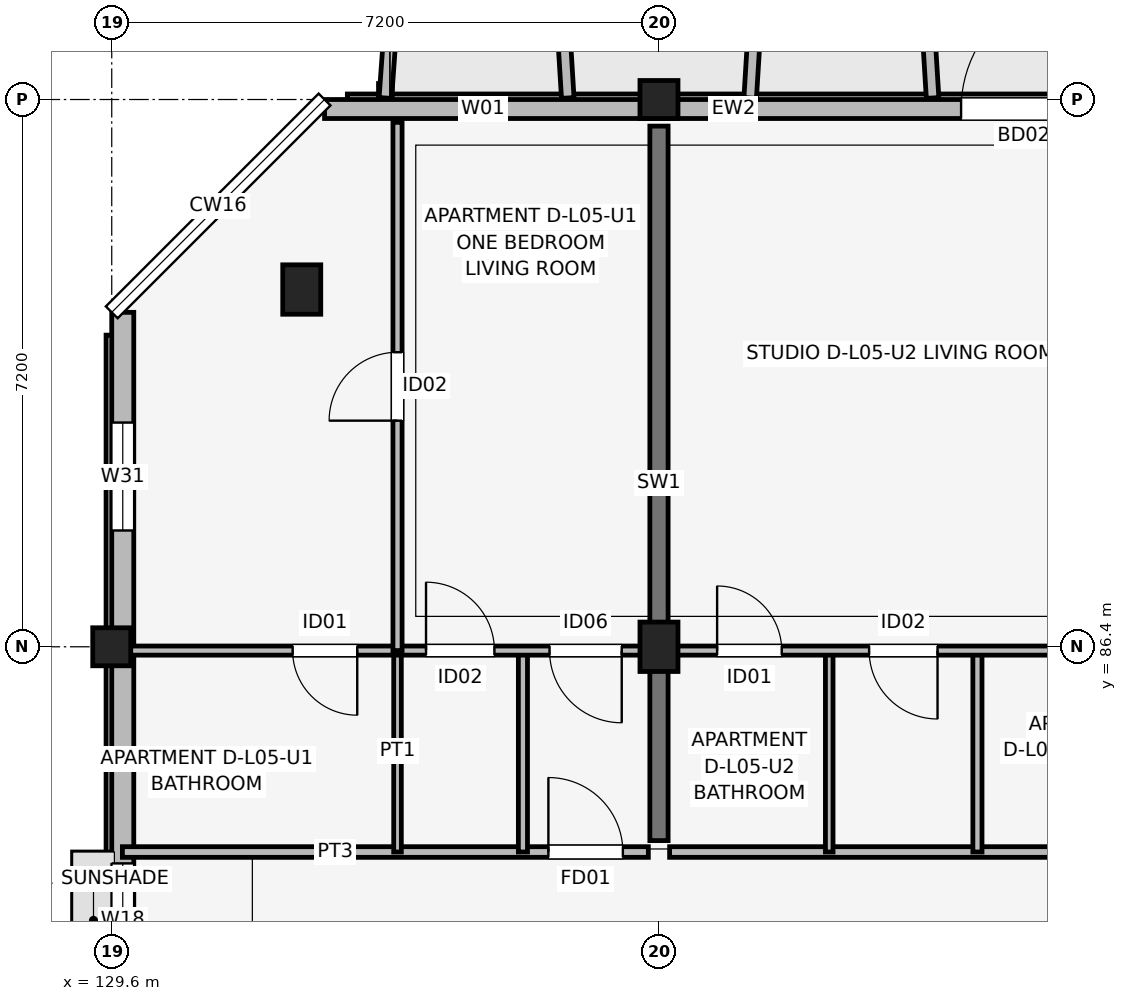
"""IFC4 building model, lengths in metres.
Left out: names, types, materials, properties, quantities, classifications, styles, units other than length and angle.
Written with IfcOpenShell. Run it as: python <this file> out.ifc"""

import sys

from ifc_helpers import new_model, si_unit, direction, frame, frame_2d, origin, origin_2d, place, context, subcontext, project, spatial, rectangle, extrude, element, fill, save


model = new_model("IFC4")
c1 = context("Model", 3, precision=1e-05, world=origin(), true_north=direction((0.0, 1.0)))
c2 = subcontext(c1, "Body", "Model", "MODEL_VIEW")
j1 = project(units=[si_unit("LENGTHUNIT", "METRE"), si_unit("PLANEANGLEUNIT", "RADIAN")], contexts=[c1])
p1 = place(None, origin())
s1 = spatial("IfcSite", under=j1, at=p1, CompositionType="ELEMENT")
p2 = place(p1, origin())
s2 = spatial("IfcBuilding", under=s1, at=p2, CompositionType="ELEMENT")
p3 = place(p2, frame((0.0, 0.0, 18.15)))
s3 = spatial("IfcBuildingStorey", under=s2, at=p3, CompositionType="ELEMENT", Elevation=18.15)
p4 = place(p3, frame((129.6, 86.4, 0.0), z_axis=(0.0, 0.0, 1.0), x_axis=(1.0, 0.0, 0.0)))
e1 = element("IfcColumn", 1, at=p4, inside=s3, PredefinedType="COLUMN", context=c2, shape_type="SweptSolid", body=[
    extrude(rectangle(XDim=0.5, YDim=0.5, at=origin_2d()), origin(), (0.0, 0.0, 1.0), 3.15),
])
for number, where, z_axis, x_axis in (
    (2, (132.1, 91.1, 0.0), (0.0, 0.0, 1.0), (1.0, 0.0, 0.0)),
    (3, (136.8, 86.4, 0.0), (0.0, 0.0, 1.0), (1.0, 0.0, 0.0)),
):
    element("IfcColumn", number, at=place(p3, frame(where, z_axis=z_axis, x_axis=x_axis)), inside=s3, PredefinedType="COLUMN", context=c2, shape_type="SweptSolid", body=[
        extrude(rectangle(XDim=0.5, YDim=0.65, at=origin_2d()), origin(), (0.0, 0.0, 1.0), 3.15),
    ])
p5 = place(p3, frame((136.8, 93.6, 0.0), z_axis=(0.0, 0.0, 1.0), x_axis=(1.0, 0.0, 0.0)))
e4 = element("IfcColumn", 4, at=p5, inside=s3, PredefinedType="COLUMN", context=c2, shape_type="SweptSolid", body=[
    extrude(rectangle(XDim=0.5, YDim=0.5, at=origin_2d()), origin(), (0.0, 0.0, 1.0), 3.15),
])
p6 = place(p3, frame((136.8, 83.85, 0.0), z_axis=(0.0, 0.0, 1.0), x_axis=(0.0, 1.0, 0.0)))
e5 = element("IfcWall", 5, at=p6, inside=s3, PredefinedType="SHEAR", context=c2, shape_type="SweptSolid", body=[
    extrude(rectangle(XDim=9.4, YDim=0.24, at=frame_2d((4.7, 0.0))), origin(), (0.0, 0.0, 1.0), 3.15),
])
p7 = place(p3, frame((162.8, 93.475, 0.0), z_axis=(0.0, 0.0, 1.0), x_axis=(-1.0, 0.0, 0.0)))
e6 = element("IfcWall", 6, at=p7, inside=s3, PredefinedType="SOLIDWALL", context=c2, shape_type="SweptSolid", body=[
    extrude(rectangle(XDim=30.4, YDim=0.25, at=frame_2d((15.2, 0.0))), origin(), (0.0, 0.0, 1.0), 2.43),
])
p8 = place(p7, frame((22.025, 0.0, 0.0), z_axis=(0.0, 0.0, 1.0), x_axis=(-1.0, 0.0, 0.0)))
e7 = element("IfcOpeningElement", 7, at=p8, cuts=e6, PredefinedType="OPENING", context=c2, shape_type="SweptSolid", body=[
    extrude(rectangle(XDim=1.65, YDim=2.15, at=frame_2d((0.825, 1.075))), frame((0.0, 0.135, 0.0), z_axis=(0.0, -1.0, 0.0), x_axis=(1.0, 0.0, 0.0)), (0.0, 0.0, 1.0), 0.27),
])
p9 = place(p7, frame((7.55, 0.0, 0.0), z_axis=(0.0, 0.0, 1.0), x_axis=(-1.0, 0.0, 0.0)))
e8 = element("IfcOpeningElement", 8, at=p9, cuts=e6, PredefinedType="OPENING", context=c2, shape_type="SweptSolid", body=[
    extrude(rectangle(XDim=1.5, YDim=2.15, at=frame_2d((0.75, 1.075))), frame((0.0, 0.135, 0.0), z_axis=(0.0, -1.0, 0.0), x_axis=(1.0, 0.0, 0.0)), (0.0, 0.0, 1.0), 0.27),
])
p10 = place(p7, frame((28.015, 0.0, 0.75)))
e9 = element("IfcOpeningElement", 9, at=p10, cuts=e6, PredefinedType="OPENING", context=c2, shape_type="SweptSolid", body=[
    extrude(rectangle(XDim=0.6, YDim=1.25, at=frame_2d((0.3, 0.625))), frame((0.0, 0.135, 0.0), z_axis=(0.0, -1.0, 0.0), x_axis=(1.0, 0.0, 0.0)), (0.0, 0.0, 1.0), 0.27),
])
p11 = place(p7, frame((15.47, 0.0, 0.7)))
e10 = element("IfcOpeningElement", 10, at=p11, cuts=e6, PredefinedType="OPENING", context=c2, shape_type="SweptSolid", body=[
    extrude(rectangle(XDim=1.86, YDim=1.6, at=frame_2d((0.93, 0.8))), frame((0.0, 0.135, 0.0), z_axis=(0.0, -1.0, 0.0), x_axis=(1.0, 0.0, 0.0)), (0.0, 0.0, 1.0), 0.27),
])
p12 = place(p7, frame((10.555, 0.0, 0.75)))
e11 = element("IfcOpeningElement", 11, at=p12, cuts=e6, PredefinedType="OPENING", context=c2, shape_type="SweptSolid", body=[
    extrude(rectangle(XDim=0.6, YDim=1.25, at=frame_2d((0.3, 0.625))), frame((0.0, 0.135, 0.0), z_axis=(0.0, -1.0, 0.0), x_axis=(1.0, 0.0, 0.0)), (0.0, 0.0, 1.0), 0.27),
])
p13 = place(p7, frame((3.355, 0.0, 0.75)))
e12 = element("IfcOpeningElement", 12, at=p13, cuts=e6, PredefinedType="OPENING", context=c2, shape_type="SweptSolid", body=[
    extrude(rectangle(XDim=0.6, YDim=1.25, at=frame_2d((0.3, 0.625))), frame((0.0, 0.135, 0.0), z_axis=(0.0, -1.0, 0.0), x_axis=(1.0, 0.0, 0.0)), (0.0, 0.0, 1.0), 0.27),
])
p14 = place(p7, frame((1.05, 0.0, 0.75)))
e13 = element("IfcOpeningElement", 13, at=p14, cuts=e6, PredefinedType="OPENING", context=c2, shape_type="SweptSolid", body=[
    extrude(rectangle(XDim=1.1, YDim=1.5, at=frame_2d((0.55, 0.75))), frame((0.0, 0.135, 0.0), z_axis=(0.0, -1.0, 0.0), x_axis=(1.0, 0.0, 0.0)), (0.0, 0.0, 1.0), 0.27),
])
p15 = place(p3, frame((129.745, 90.8, 0.0), z_axis=(0.0, 0.0, 1.0), x_axis=(0.0, -1.0, 0.0)))
e14 = element("IfcWall", 14, at=p15, inside=s3, PredefinedType="SOLIDWALL", context=c2, shape_type="SweptSolid", body=[
    extrude(rectangle(XDim=16.0, YDim=0.29, at=frame_2d((8.0, 0.0))), origin(), (0.0, 0.0, 1.0), 2.38),
])
p16 = place(p15, frame((7.25, 0.0, 1.05)))
e15 = element("IfcOpeningElement", 15, at=p16, cuts=e14, PredefinedType="OPENING", context=c2, shape_type="SweptSolid", body=[
    extrude(rectangle(XDim=1.5, YDim=1.15, at=frame_2d((0.75, 0.575))), frame((0.0, 0.155, 0.0), z_axis=(0.0, -1.0, 0.0), x_axis=(1.0, 0.0, 0.0)), (0.0, 0.0, 1.0), 0.31),
])
p17 = place(p15, frame((1.45, 0.0, 0.67)))
e16 = element("IfcOpeningElement", 16, at=p17, cuts=e14, PredefinedType="OPENING", context=c2, shape_type="SweptSolid", body=[
    extrude(rectangle(XDim=1.42, YDim=1.6, at=frame_2d((0.71, 0.8))), frame((0.0, 0.155, 0.0), z_axis=(0.0, -1.0, 0.0), x_axis=(1.0, 0.0, 0.0)), (0.0, 0.0, 1.0), 0.31),
])
p18 = place(p3, frame((133.2, 93.62, 0.0), z_axis=(0.0, 0.0, 1.0), x_axis=(0.071317687608, 0.997453651772, 0.0)))
e17 = element("IfcWall", 17, at=p18, inside=s3, PredefinedType="ELEMENTEDWALL", context=c2, shape_type="SweptSolid", body=[
    extrude(rectangle(XDim=1.965, YDim=0.165, at=frame_2d((0.982, 0.0))), origin(), (0.0, 0.0, 1.0), 2.95),
])
p19 = place(p3, frame((135.6, 93.62, 0.0), z_axis=(0.0, 0.0, 1.0), x_axis=(-0.061170732449, 0.998127317276, 0.0)))
e18 = element("IfcWall", 18, at=p19, inside=s3, PredefinedType="ELEMENTEDWALL", context=c2, shape_type="SweptSolid", body=[
    extrude(rectangle(XDim=1.964, YDim=0.165, at=frame_2d((0.982, 0.0))), origin(), (0.0, 0.0, 1.0), 2.95),
])
for number, where, z_axis, x_axis in (
    (19, (138.0, 93.62, 0.0), (0.0, 0.0, 1.0), (0.061, 0.998, 0.0)),
    (20, (140.4, 93.62, 0.0), (0.0, 0.0, 1.0), (-0.061, 0.998, 0.0)),
):
    element("IfcWall", number, at=place(p3, frame(where, z_axis=z_axis, x_axis=x_axis)), inside=s3, PredefinedType="ELEMENTEDWALL", context=c2, shape_type="SweptSolid", body=[
        extrude(rectangle(XDim=1.964, YDim=0.165, at=frame_2d((0.982, 0.0))), origin(), (0.0, 0.0, 1.0), 2.55),
    ])
p20 = place(p3, frame((129.74, 83.7, 0.0), z_axis=(0.0, 0.0, 1.0), x_axis=(1.0, 0.0, 0.0)))
e21 = element("IfcWall", 21, at=p20, inside=s3, PredefinedType="PARTITIONING", context=c2, shape_type="SweptSolid", body=[
    extrude(rectangle(XDim=6.92, YDim=0.14, at=frame_2d((3.46, 0.0))), origin(), (0.0, 0.0, 1.0), 2.38),
])
p21 = place(p20, frame((5.605, 0.0, 0.0)))
e22 = element("IfcOpeningElement", 22, at=p21, cuts=e21, PredefinedType="OPENING", context=c2, shape_type="SweptSolid", body=[
    extrude(rectangle(XDim=0.98, YDim=2.1, at=frame_2d((0.49, 1.05))), frame((0.0, 0.08, 0.0), z_axis=(0.0, -1.0, 0.0), x_axis=(1.0, 0.0, 0.0)), (0.0, 0.0, 1.0), 0.16),
])
p22 = place(p3, frame((133.36, 83.7, 0.0), z_axis=(0.0, 0.0, 1.0), x_axis=(0.0, 1.0, 0.0)))
e23 = element("IfcWall", 23, at=p22, inside=s3, PredefinedType="PARTITIONING", context=c2, shape_type="SweptSolid", body=[
    extrude(rectangle(XDim=2.65, YDim=0.1, at=frame_2d((1.325, 0.0))), origin(), (0.0, 0.0, 1.0), 2.375),
])
p23 = place(p3, frame((135.01, 83.7, 0.0), z_axis=(0.0, 0.0, 1.0), x_axis=(0.0, 1.0, 0.0)))
e24 = element("IfcWall", 24, at=p23, inside=s3, PredefinedType="PARTITIONING", context=c2, shape_type="SweptSolid", body=[
    extrude(rectangle(XDim=2.65, YDim=0.12, at=frame_2d((1.325, 0.0))), origin(), (0.0, 0.0, 1.0), 2.375),
])
p24 = place(p3, frame((129.74, 86.35, 0.0), z_axis=(0.0, 0.0, 1.0), x_axis=(1.0, 0.0, 0.0)))
e25 = element("IfcWall", 25, at=p24, inside=s3, PredefinedType="PARTITIONING", context=c2, shape_type="SweptSolid", body=[
    extrude(rectangle(XDim=6.92, YDim=0.12, at=frame_2d((3.46, 0.0))), origin(), (0.0, 0.0, 1.0), 2.375),
])
p25 = place(p24, frame((3.09, 0.0, 0.0), z_axis=(0.0, 0.0, 1.0), x_axis=(-1.0, 0.0, 0.0)))
e26 = element("IfcOpeningElement", 26, at=p25, cuts=e25, PredefinedType="OPENING", context=c2, shape_type="SweptSolid", body=[
    extrude(rectangle(XDim=0.85, YDim=2.08, at=frame_2d((0.425, 1.04))), frame((0.0, 0.07, 0.0), z_axis=(0.0, -1.0, 0.0), x_axis=(1.0, 0.0, 0.0)), (0.0, 0.0, 1.0), 0.14),
])
p26 = place(p24, frame((3.995, 0.0, 0.0)))
e27 = element("IfcOpeningElement", 27, at=p26, cuts=e25, PredefinedType="OPENING", context=c2, shape_type="SweptSolid", body=[
    extrude(rectangle(XDim=0.9, YDim=2.08, at=frame_2d((0.45, 1.04))), frame((0.0, 0.07, 0.0), z_axis=(0.0, -1.0, 0.0), x_axis=(1.0, 0.0, 0.0)), (0.0, 0.0, 1.0), 0.14),
])
p27 = place(p24, frame((6.57, 0.0, 0.0), z_axis=(0.0, 0.0, 1.0), x_axis=(-1.0, 0.0, 0.0)))
e28 = element("IfcOpeningElement", 28, at=p27, cuts=e25, PredefinedType="OPENING", context=c2, shape_type="SweptSolid", body=[
    extrude(rectangle(XDim=0.95, YDim=2.08, at=frame_2d((0.475, 1.04))), frame((0.0, 0.07, 0.0), z_axis=(0.0, -1.0, 0.0), x_axis=(1.0, 0.0, 0.0)), (0.0, 0.0, 1.0), 0.14),
])
p28 = place(p3, frame((133.36, 86.35, 0.0), z_axis=(0.0, 0.0, 1.0), x_axis=(0.0, 1.0, 0.0)))
e29 = element("IfcWall", 29, at=p28, inside=s3, PredefinedType="PARTITIONING", context=c2, shape_type="SweptSolid", body=[
    extrude(rectangle(XDim=6.95, YDim=0.12, at=frame_2d((3.475, 0.0))), origin(), (0.0, 0.0, 1.0), 2.375),
])
p29 = place(p28, frame((3.025, 0.0, 0.0)))
e30 = element("IfcOpeningElement", 30, at=p29, cuts=e29, PredefinedType="OPENING", context=c2, shape_type="SweptSolid", body=[
    extrude(rectangle(XDim=0.9, YDim=2.08, at=frame_2d((0.45, 1.04))), frame((0.0, 0.07, 0.0), z_axis=(0.0, -1.0, 0.0), x_axis=(1.0, 0.0, 0.0)), (0.0, 0.0, 1.0), 0.14),
])
p30 = place(p3, frame((136.94, 83.7, 0.0), z_axis=(0.0, 0.0, 1.0), x_axis=(1.0, 0.0, 0.0)))
e31 = element("IfcWall", 31, at=p30, inside=s3, PredefinedType="PARTITIONING", context=c2, shape_type="SweptSolid", body=[
    extrude(rectangle(XDim=6.92, YDim=0.14, at=frame_2d((3.46, 0.0))), origin(), (0.0, 0.0, 1.0), 2.38),
])
p31 = place(p30, frame((5.975, 0.0, 0.0), z_axis=(0.0, 0.0, 1.0), x_axis=(-1.0, 0.0, 0.0)))
e32 = element("IfcOpeningElement", 32, at=p31, cuts=e31, PredefinedType="OPENING", context=c2, shape_type="SweptSolid", body=[
    extrude(rectangle(XDim=0.98, YDim=2.1, at=frame_2d((0.49, 1.05))), frame((0.0, 0.08, 0.0), z_axis=(0.0, -1.0, 0.0), x_axis=(1.0, 0.0, 0.0)), (0.0, 0.0, 1.0), 0.16),
])
p32 = place(p3, frame((139.04, 83.7, 0.0), z_axis=(0.0, 0.0, 1.0), x_axis=(0.0, 1.0, 0.0)))
e33 = element("IfcWall", 33, at=p32, inside=s3, PredefinedType="PARTITIONING", context=c2, shape_type="SweptSolid", body=[
    extrude(rectangle(XDim=2.65, YDim=0.1, at=frame_2d((1.325, 0.0))), origin(), (0.0, 0.0, 1.0), 2.375),
])
p33 = place(p3, frame((140.99, 83.7, 0.0), z_axis=(0.0, 0.0, 1.0), x_axis=(0.0, 1.0, 0.0)))
e34 = element("IfcWall", 34, at=p33, inside=s3, PredefinedType="PARTITIONING", context=c2, shape_type="SweptSolid", body=[
    extrude(rectangle(XDim=2.65, YDim=0.12, at=frame_2d((1.325, 0.0))), origin(), (0.0, 0.0, 1.0), 2.375),
])
p34 = place(p3, frame((136.94, 86.35, 0.0), z_axis=(0.0, 0.0, 1.0), x_axis=(1.0, 0.0, 0.0)))
e35 = element("IfcWall", 35, at=p34, inside=s3, PredefinedType="PARTITIONING", context=c2, shape_type="SweptSolid", body=[
    extrude(rectangle(XDim=6.92, YDim=0.12, at=frame_2d((3.46, 0.0))), origin(), (0.0, 0.0, 1.0), 2.375),
])
p35 = place(p34, frame((0.625, 0.0, 0.0)))
e36 = element("IfcOpeningElement", 36, at=p35, cuts=e35, PredefinedType="OPENING", context=c2, shape_type="SweptSolid", body=[
    extrude(rectangle(XDim=0.85, YDim=2.08, at=frame_2d((0.425, 1.04))), frame((0.0, 0.07, 0.0), z_axis=(0.0, -1.0, 0.0), x_axis=(1.0, 0.0, 0.0)), (0.0, 0.0, 1.0), 0.14),
])
p36 = place(p34, frame((3.525, 0.0, 0.0), z_axis=(0.0, 0.0, 1.0), x_axis=(-1.0, 0.0, 0.0)))
e37 = element("IfcOpeningElement", 37, at=p36, cuts=e35, PredefinedType="OPENING", context=c2, shape_type="SweptSolid", body=[
    extrude(rectangle(XDim=0.9, YDim=2.08, at=frame_2d((0.45, 1.04))), frame((0.0, 0.07, 0.0), z_axis=(0.0, -1.0, 0.0), x_axis=(1.0, 0.0, 0.0)), (0.0, 0.0, 1.0), 0.14),
])
p37 = place(p34, frame((5.01, 0.0, 0.0)))
e38 = element("IfcOpeningElement", 38, at=p37, cuts=e35, PredefinedType="OPENING", context=c2, shape_type="SweptSolid", body=[
    extrude(rectangle(XDim=0.95, YDim=2.08, at=frame_2d((0.475, 1.04))), frame((0.0, 0.07, 0.0), z_axis=(0.0, -1.0, 0.0), x_axis=(1.0, 0.0, 0.0)), (0.0, 0.0, 1.0), 0.14),
])
p38 = place(p8, origin())
e39 = element("IfcDoor", 39, at=p38, inside=s3, OperationType="SINGLE_SWING_LEFT", PredefinedType="DOOR", context=c2, shape_type="SweptSolid", body=[
    extrude(rectangle(XDim=1.65, YDim=2.15, at=frame_2d((0.825, 1.075))), frame((0.0, 0.025, 0.0), z_axis=(0.0, -1.0, 0.0), x_axis=(1.0, 0.0, 0.0)), (0.0, 0.0, 1.0), 0.05),
])
fill(e7, e39)
p39 = place(p10, origin())
e40 = element("IfcWindow", 40, at=p39, inside=s3, PartitioningType="SINGLE_PANEL", PredefinedType="WINDOW", context=c2, shape_type="SweptSolid", body=[
    extrude(rectangle(XDim=0.6, YDim=1.25, at=frame_2d((0.3, 0.625))), frame((0.0, 0.03, 0.0), z_axis=(0.0, -1.0, 0.0), x_axis=(1.0, 0.0, 0.0)), (0.0, 0.0, 1.0), 0.06),
])
fill(e9, e40)
p40 = place(p16, origin())
e41 = element("IfcWindow", 41, at=p40, inside=s3, PartitioningType="SINGLE_PANEL", PredefinedType="WINDOW", context=c2, shape_type="SweptSolid", body=[
    extrude(rectangle(XDim=1.5, YDim=1.15, at=frame_2d((0.75, 0.575))), frame((0.0, 0.03, 0.0), z_axis=(0.0, -1.0, 0.0), x_axis=(1.0, 0.0, 0.0)), (0.0, 0.0, 1.0), 0.06),
])
fill(e15, e41)
p41 = place(p17, origin())
e42 = element("IfcWindow", 42, at=p41, inside=s3, PartitioningType="SINGLE_PANEL", PredefinedType="WINDOW", context=c2, shape_type="SweptSolid", body=[
    extrude(rectangle(XDim=1.42, YDim=1.6, at=frame_2d((0.71, 0.8))), frame((0.0, 0.03, 0.0), z_axis=(0.0, -1.0, 0.0), x_axis=(1.0, 0.0, 0.0)), (0.0, 0.0, 1.0), 0.06),
])
fill(e16, e42)
p42 = place(p21, origin())
e43 = element("IfcDoor", 43, at=p42, inside=s3, OperationType="SINGLE_SWING_LEFT", PredefinedType="DOOR", context=c2, shape_type="SweptSolid", body=[
    extrude(rectangle(XDim=0.98, YDim=2.1, at=frame_2d((0.49, 1.05))), frame((0.0, 0.025, 0.0), z_axis=(0.0, -1.0, 0.0), x_axis=(1.0, 0.0, 0.0)), (0.0, 0.0, 1.0), 0.05),
])
fill(e22, e43)
p43 = place(p25, origin())
e44 = element("IfcDoor", 44, at=p43, inside=s3, OperationType="SINGLE_SWING_RIGHT", PredefinedType="DOOR", context=c2, shape_type="SweptSolid", body=[
    extrude(rectangle(XDim=0.85, YDim=2.08, at=frame_2d((0.425, 1.04))), frame((0.0, 0.025, 0.0), z_axis=(0.0, -1.0, 0.0), x_axis=(1.0, 0.0, 0.0)), (0.0, 0.0, 1.0), 0.05),
])
fill(e26, e44)
p44 = place(p26, origin())
e45 = element("IfcDoor", 45, at=p44, inside=s3, OperationType="SINGLE_SWING_LEFT", PredefinedType="DOOR", context=c2, shape_type="SweptSolid", body=[
    extrude(rectangle(XDim=0.9, YDim=2.08, at=frame_2d((0.45, 1.04))), frame((0.0, 0.025, 0.0), z_axis=(0.0, -1.0, 0.0), x_axis=(1.0, 0.0, 0.0)), (0.0, 0.0, 1.0), 0.05),
])
fill(e27, e45)
p45 = place(p27, origin())
e46 = element("IfcDoor", 46, at=p45, inside=s3, OperationType="SINGLE_SWING_RIGHT", PredefinedType="DOOR", context=c2, shape_type="SweptSolid", body=[
    extrude(rectangle(XDim=0.95, YDim=2.08, at=frame_2d((0.475, 1.04))), frame((0.0, 0.025, 0.0), z_axis=(0.0, -1.0, 0.0), x_axis=(1.0, 0.0, 0.0)), (0.0, 0.0, 1.0), 0.05),
])
fill(e28, e46)
p46 = place(p29, origin())
e47 = element("IfcDoor", 47, at=p46, inside=s3, OperationType="SINGLE_SWING_LEFT", PredefinedType="DOOR", context=c2, shape_type="SweptSolid", body=[
    extrude(rectangle(XDim=0.9, YDim=2.08, at=frame_2d((0.45, 1.04))), frame((0.0, 0.025, 0.0), z_axis=(0.0, -1.0, 0.0), x_axis=(1.0, 0.0, 0.0)), (0.0, 0.0, 1.0), 0.05),
])
fill(e30, e47)
p47 = place(p35, origin())
e48 = element("IfcDoor", 48, at=p47, inside=s3, OperationType="SINGLE_SWING_LEFT", PredefinedType="DOOR", context=c2, shape_type="SweptSolid", body=[
    extrude(rectangle(XDim=0.85, YDim=2.08, at=frame_2d((0.425, 1.04))), frame((0.0, 0.025, 0.0), z_axis=(0.0, -1.0, 0.0), x_axis=(1.0, 0.0, 0.0)), (0.0, 0.0, 1.0), 0.05),
])
fill(e36, e48)
p48 = place(p36, origin())
e49 = element("IfcDoor", 49, at=p48, inside=s3, OperationType="SINGLE_SWING_RIGHT", PredefinedType="DOOR", context=c2, shape_type="SweptSolid", body=[
    extrude(rectangle(XDim=0.9, YDim=2.08, at=frame_2d((0.45, 1.04))), frame((0.0, 0.025, 0.0), z_axis=(0.0, -1.0, 0.0), x_axis=(1.0, 0.0, 0.0)), (0.0, 0.0, 1.0), 0.05),
])
fill(e37, e49)
save(model, sys.argv[1])
